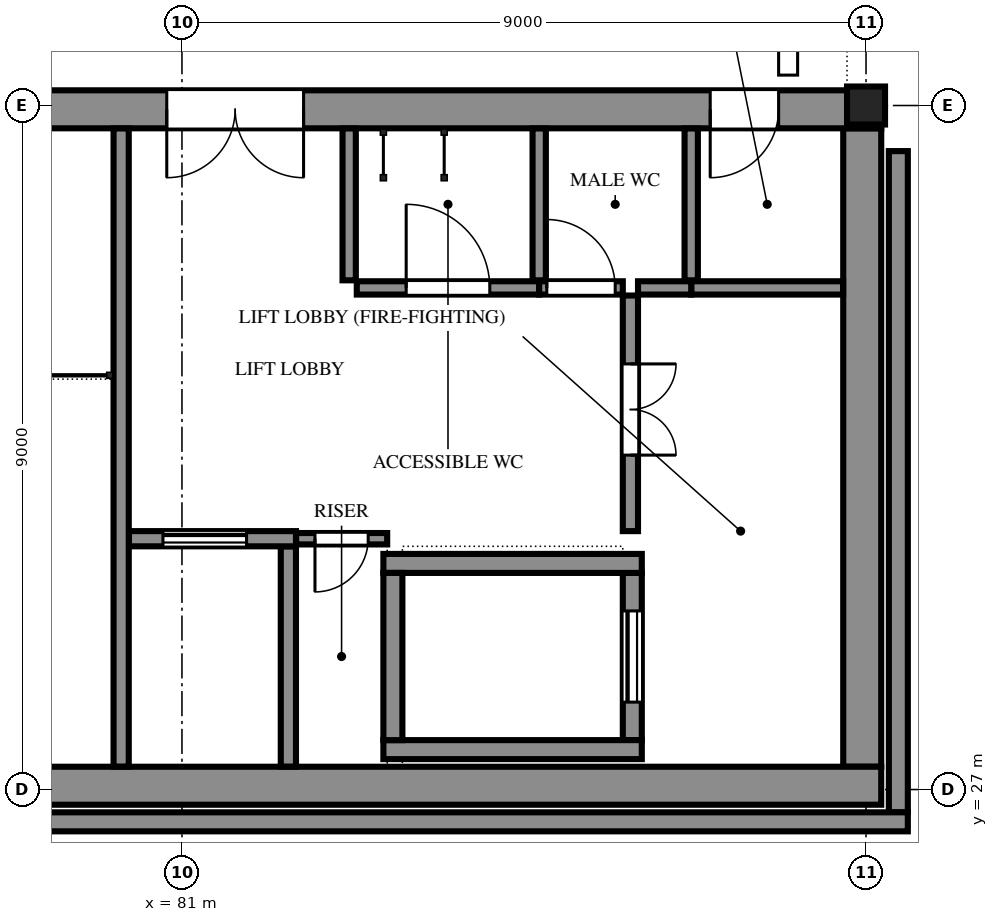
"""IFC4 building model, lengths in metres.
Left out: names, types, materials, properties, quantities, classifications, styles, units other than length and angle.
Written with IfcOpenShell. Run it as: python <this file> out.ifc"""

import sys

from ifc_helpers import new_model, si_unit, direction, frame, frame_2d, origin, origin_2d, place, context, subcontext, project, spatial, polyline, rectangle, hollow_rectangle, outline, extrude, element, fill, save


model = new_model("IFC4")
c1 = context("Model", 3, precision=1e-05, world=origin(), true_north=direction((0.0, 1.0)))
c2 = subcontext(c1, "Body", "Model", "MODEL_VIEW")
j1 = project(units=[si_unit("LENGTHUNIT", "METRE"), si_unit("PLANEANGLEUNIT", "RADIAN")], contexts=[c1])
p1 = place(None, origin())
s1 = spatial("IfcSite", under=j1, at=p1, CompositionType="ELEMENT")
p2 = place(p1, origin())
s2 = spatial("IfcBuilding", under=s1, at=p2, CompositionType="ELEMENT")
p3 = place(p2, frame((0.0, 0.0, 20.1)))
s3 = spatial("IfcBuildingStorey", under=s2, at=p3, CompositionType="ELEMENT", Elevation=20.1)
p4 = place(p3, frame((90.0, 36.0, 0.0), z_axis=(0.0, 0.0, 1.0), x_axis=(1.0, 0.0, 0.0)))
e1 = element("IfcColumn", 1, at=p4, inside=s3, PredefinedType="COLUMN", context=c2, shape_type="SweptSolid", body=[
    extrude(hollow_rectangle(XDim=0.5, YDim=0.5, WallThickness=0.032, at=origin_2d()), origin(), (0.0, 0.0, 1.0), 4.2),
])
p5 = place(p3, frame((71.8, 27.05, 0.0), z_axis=(0.0, 0.0, 1.0), x_axis=(1.0, 0.0, 0.0)))
e2 = element("IfcWall", 2, at=p5, inside=s3, PredefinedType="SOLIDWALL", context=c2, shape_type="SweptSolid", body=[
    extrude(rectangle(XDim=18.4, YDim=0.5, at=frame_2d((9.2, 0.0))), origin(), (0.0, 0.0, 1.0), 4.2),
])
p6 = place(p3, frame((71.8, 35.95, 0.0), z_axis=(0.0, 0.0, 1.0), x_axis=(1.0, 0.0, 0.0)))
e3 = element("IfcWall", 3, at=p6, inside=s3, PredefinedType="SOLIDWALL", context=c2, shape_type="SweptSolid", body=[
    extrude(rectangle(XDim=18.4, YDim=0.5, at=frame_2d((9.2, 0.0))), origin(), (0.0, 0.0, 1.0), 4.2),
])
p7 = place(p6, frame((1.5, 0.0, 0.0)))
e4 = element("IfcOpeningElement", 4, at=p7, cuts=e3, PredefinedType="OPENING", context=c2, shape_type="SweptSolid", body=[
    extrude(rectangle(XDim=1.8, YDim=2.1, at=frame_2d((0.9, 1.05))), frame((0.0, 0.26, 0.0), z_axis=(0.0, -1.0, 0.0), x_axis=(1.0, 0.0, 0.0)), (0.0, 0.0, 1.0), 0.52),
])
p8 = place(p6, frame((5.5, 0.0, 0.0)))
e5 = element("IfcOpeningElement", 5, at=p8, cuts=e3, PredefinedType="OPENING", context=c2, shape_type="SweptSolid", body=[
    extrude(rectangle(XDim=1.8, YDim=2.1, at=frame_2d((0.9, 1.05))), frame((0.0, 0.26, 0.0), z_axis=(0.0, -1.0, 0.0), x_axis=(1.0, 0.0, 0.0)), (0.0, 0.0, 1.0), 0.52),
])
p9 = place(p6, frame((9.0, 0.0, 0.0)))
e6 = element("IfcOpeningElement", 6, at=p9, cuts=e3, PredefinedType="OPENING", context=c2, shape_type="SweptSolid", body=[
    extrude(rectangle(XDim=1.8, YDim=2.1, at=frame_2d((0.9, 1.05))), frame((0.0, 0.26, 0.0), z_axis=(0.0, -1.0, 0.0), x_axis=(1.0, 0.0, 0.0)), (0.0, 0.0, 1.0), 0.52),
])
p10 = place(p6, frame((16.15, 0.0, 0.0)))
e7 = element("IfcOpeningElement", 7, at=p10, cuts=e3, PredefinedType="OPENING", context=c2, shape_type="SweptSolid", body=[
    extrude(rectangle(XDim=0.9, YDim=2.1, at=frame_2d((0.45, 1.05))), frame((0.0, 0.26, 0.0), z_axis=(0.0, -1.0, 0.0), x_axis=(1.0, 0.0, 0.0)), (0.0, 0.0, 1.0), 0.52),
])
p11 = place(p3, frame((89.95, 27.3, 0.0), z_axis=(0.0, 0.0, 1.0), x_axis=(0.0, 1.0, 0.0)))
e8 = element("IfcWall", 8, at=p11, inside=s3, PredefinedType="SOLIDWALL", context=c2, shape_type="SweptSolid", body=[
    extrude(rectangle(XDim=8.4, YDim=0.5, at=frame_2d((4.2, 0.0))), origin(), (0.0, 0.0, 1.0), 4.2),
])
p12 = place(p3, frame((80.2, 27.302, -0.15), z_axis=(0.0, 0.0, 1.0), x_axis=(0.0, 1.0, 0.0)))
e9 = element("IfcWall", 9, at=p12, inside=s3, PredefinedType="SOLIDWALL", context=c2, shape_type="SweptSolid", body=[
    extrude(rectangle(XDim=8.396, YDim=0.2, at=frame_2d((4.198, 0.0))), origin(), (0.0, 0.0, 1.0), 3.666),
])
p13 = place(p3, frame((80.302, 30.3, 0.0), z_axis=(0.0, 0.0, 1.0), x_axis=(1.0, 0.0, 0.0)))
e10 = element("IfcWall", 10, at=p13, inside=s3, PredefinedType="SOLIDWALL", context=c2, shape_type="SweptSolid", body=[
    extrude(rectangle(XDim=2.198, YDim=0.2, at=frame_2d((1.099, 0.0))), origin(), (0.0, 0.0, 1.0), 3.516),
])
p14 = place(p13, frame((0.448, 0.0, 0.0)))
e11 = element("IfcOpeningElement", 11, at=p14, cuts=e10, PredefinedType="OPENING", context=c2, shape_type="SweptSolid", body=[
    extrude(rectangle(XDim=1.1, YDim=2.1, at=frame_2d((0.55, 1.05))), frame((0.0, 0.11, 0.0), z_axis=(0.0, -1.0, 0.0), x_axis=(1.0, 0.0, 0.0)), (0.0, 0.0, 1.0), 0.22),
])
p15 = place(p3, frame((82.4, 27.302, 0.0), z_axis=(0.0, 0.0, 1.0), x_axis=(0.0, 1.0, 0.0)))
e12 = element("IfcWall", 12, at=p15, inside=s3, PredefinedType="SOLIDWALL", context=c2, shape_type="SweptSolid", body=[
    extrude(rectangle(XDim=2.898, YDim=0.2, at=frame_2d((1.449, 0.0))), origin(), (0.0, 0.0, 1.0), 3.516),
])
for number, where, z_axis, x_axis in (
    (13, (83.65, 27.525, 0.0), (0.0, 0.0, 1.0), (1.0, 0.0, 0.0)),
    (14, (83.65, 29.975, 0.0), (0.0, 0.0, 1.0), (1.0, 0.0, 0.0)),
):
    element("IfcWall", number, at=place(p3, frame(where, z_axis=z_axis, x_axis=x_axis)), inside=s3, PredefinedType="SOLIDWALL", context=c2, shape_type="SweptSolid", body=[
        extrude(rectangle(XDim=3.4, YDim=0.25, at=frame_2d((1.7, 0.0))), origin(), (0.0, 0.0, 1.0), 3.516),
    ])
p16 = place(p3, frame((83.775, 27.65, 0.0), z_axis=(0.0, 0.0, 1.0), x_axis=(0.0, 1.0, 0.0)))
e15 = element("IfcWall", 15, at=p16, inside=s3, PredefinedType="SOLIDWALL", context=c2, shape_type="SweptSolid", body=[
    extrude(rectangle(XDim=2.2, YDim=0.25, at=frame_2d((1.1, 0.0))), origin(), (0.0, 0.0, 1.0), 3.516),
])
p17 = place(p3, frame((86.925, 27.65, 0.0), z_axis=(0.0, 0.0, 1.0), x_axis=(0.0, 1.0, 0.0)))
e16 = element("IfcWall", 16, at=p17, inside=s3, PredefinedType="SOLIDWALL", context=c2, shape_type="SweptSolid", body=[
    extrude(rectangle(XDim=2.2, YDim=0.25, at=frame_2d((1.1, 0.0))), origin(), (0.0, 0.0, 1.0), 3.516),
])
p18 = place(p17, frame((0.5, 0.0, 0.0)))
e17 = element("IfcOpeningElement", 17, at=p18, cuts=e16, PredefinedType="OPENING", context=c2, shape_type="SweptSolid", body=[
    extrude(rectangle(XDim=1.2, YDim=2.1, at=frame_2d((0.6, 1.05))), frame((0.0, 0.135, 0.0), z_axis=(0.0, -1.0, 0.0), x_axis=(1.0, 0.0, 0.0)), (0.0, 0.0, 1.0), 0.27),
])
p19 = place(p3, frame((83.7, 30.3, 0.0), z_axis=(0.0, 0.0, 1.0), x_axis=(-1.0, 0.0, 0.0)))
e18 = element("IfcWall", 18, at=p19, inside=s3, PredefinedType="SOLIDWALL", context=c2, shape_type="SweptSolid", body=[
    extrude(rectangle(XDim=1.198, YDim=0.15, at=frame_2d((0.599, 0.0))), origin(), (0.0, 0.0, 1.0), 3.516),
])
p20 = place(p19, frame((0.25, 0.0, 0.0)))
e19 = element("IfcOpeningElement", 19, at=p20, cuts=e18, PredefinedType="OPENING", context=c2, shape_type="SweptSolid", body=[
    extrude(rectangle(XDim=0.7, YDim=2.0, at=frame_2d((0.35, 1.0))), frame((0.0, 0.085, 0.0), z_axis=(0.0, -1.0, 0.0), x_axis=(1.0, 0.0, 0.0)), (0.0, 0.0, 1.0), 0.17),
])
p21 = place(p3, frame((86.9, 33.5, 0.0), z_axis=(0.0, 0.0, 1.0), x_axis=(0.0, -1.0, 0.0)))
e20 = element("IfcWall", 20, at=p21, inside=s3, PredefinedType="PARTITIONING", context=c2, shape_type="SweptSolid", body=[
    extrude(rectangle(XDim=3.1, YDim=0.2, at=frame_2d((1.55, 0.0))), origin(), (0.0, 0.0, 1.0), 3.382),
])
p22 = place(p21, frame((0.9, 0.0, 0.0)))
e21 = element("IfcOpeningElement", 21, at=p22, cuts=e20, PredefinedType="OPENING", context=c2, shape_type="SweptSolid", body=[
    extrude(rectangle(XDim=1.2, YDim=2.1, at=frame_2d((0.6, 1.05))), frame((0.0, 0.11, 0.0), z_axis=(0.0, -1.0, 0.0), x_axis=(1.0, 0.0, 0.0)), (0.0, 0.0, 1.0), 0.22),
])
p23 = place(p3, frame((83.2, 35.698, 0.0), z_axis=(0.0, 0.0, 1.0), x_axis=(0.0, -1.0, 0.0)))
e22 = element("IfcWall", 22, at=p23, inside=s3, PredefinedType="PARTITIONING", context=c2, shape_type="SweptSolid", body=[
    extrude(rectangle(XDim=1.998, YDim=0.175, at=frame_2d((0.999, 0.0))), origin(), (0.0, 0.0, 1.0), 3.307),
])
p24 = place(p3, frame((83.3, 33.6, 0.0), z_axis=(0.0, 0.0, 1.0), x_axis=(1.0, 0.0, 0.0)))
e23 = element("IfcWall", 23, at=p24, inside=s3, PredefinedType="PARTITIONING", context=c2, shape_type="SweptSolid", body=[
    extrude(rectangle(XDim=2.4, YDim=0.175, at=frame_2d((1.2, 0.0))), origin(), (0.0, 0.0, 1.0), 3.307),
])
p25 = place(p24, frame((0.65, 0.0, 0.0)))
e24 = element("IfcOpeningElement", 24, at=p25, cuts=e23, PredefinedType="OPENING", context=c2, shape_type="SweptSolid", body=[
    extrude(rectangle(XDim=1.1, YDim=2.1, at=frame_2d((0.55, 1.05))), frame((0.0, 0.097, 0.0), z_axis=(0.0, -1.0, 0.0), x_axis=(1.0, 0.0, 0.0)), (0.0, 0.0, 1.0), 0.195),
])
p26 = place(p3, frame((85.7, 33.6, 0.0), z_axis=(0.0, 0.0, 1.0), x_axis=(1.0, 0.0, 0.0)))
e25 = element("IfcWall", 25, at=p26, inside=s3, PredefinedType="PARTITIONING", context=c2, shape_type="SweptSolid", body=[
    extrude(rectangle(XDim=1.1, YDim=0.175, at=frame_2d((0.55, 0.0))), origin(), (0.0, 0.0, 1.0), 3.307),
])
p27 = place(p26, frame((0.1, 0.0, 0.0)))
e26 = element("IfcOpeningElement", 26, at=p27, cuts=e25, PredefinedType="OPENING", context=c2, shape_type="SweptSolid", body=[
    extrude(rectangle(XDim=0.9, YDim=2.1, at=frame_2d((0.45, 1.05))), frame((0.0, 0.097, 0.0), z_axis=(0.0, -1.0, 0.0), x_axis=(1.0, 0.0, 0.0)), (0.0, 0.0, 1.0), 0.195),
])
p28 = place(p3, frame((87.7, 33.6, 0.0), z_axis=(0.0, 0.0, 1.0), x_axis=(1.0, 0.0, 0.0)))
e27 = element("IfcWall", 27, at=p28, inside=s3, PredefinedType="PARTITIONING", context=c2, shape_type="SweptSolid", body=[
    extrude(rectangle(XDim=1.998, YDim=0.175, at=frame_2d((0.999, 0.0))), origin(), (0.0, 0.0, 1.0), 3.307),
])
p29 = place(p3, frame((87.0, 33.6, 0.0), z_axis=(0.0, 0.0, 1.0), x_axis=(1.0, 0.0, 0.0)))
e28 = element("IfcWall", 28, at=p29, inside=s3, PredefinedType="PARTITIONING", context=c2, shape_type="SweptSolid", body=[
    extrude(rectangle(XDim=0.7, YDim=0.175, at=frame_2d((0.35, 0.0))), origin(), (0.0, 0.0, 1.0), 3.307),
])
for number, where, z_axis, x_axis in (
    (29, (85.7, 35.698, 0.0), (0.0, 0.0, 1.0), (0.0, -1.0, 0.0)),
    (30, (87.7, 35.698, 0.0), (0.0, 0.0, 1.0), (0.0, -1.0, 0.0)),
):
    element("IfcWall", number, at=place(p3, frame(where, z_axis=z_axis, x_axis=x_axis)), inside=s3, PredefinedType="PARTITIONING", context=c2, shape_type="SweptSolid", body=[
        extrude(rectangle(XDim=1.998, YDim=0.175, at=frame_2d((0.999, 0.0))), origin(), (0.0, 0.0, 1.0), 3.307),
    ])
p30 = place(p14, origin())
e31 = element("IfcDoor", 31, at=p30, inside=s3, OperationType="SLIDING_TO_LEFT", PredefinedType="DOOR", context=c2, shape_type="SweptSolid", body=[
    extrude(outline(polyline([(0.0, 0.0), (0.07, 0.0), (0.07, 2.03), (1.03, 2.03), (1.03, 0.0), (1.1, 0.0), (1.1, 2.1), (0.0, 2.1), (0.0, 0.0)])), frame((0.0, 0.025, 0.0), z_axis=(0.0, -1.0, 0.0), x_axis=(1.0, 0.0, 0.0)), (0.0, 0.0, 1.0), 0.05),
    extrude(rectangle(XDim=0.524, YDim=2.016, at=frame_2d((0.336, 1.018))), frame((0.0, 0.018, 0.0), z_axis=(0.0, -1.0, 0.0), x_axis=(1.0, 0.0, 0.0)), (0.0, 0.0, 1.0), 0.016),
    extrude(rectangle(XDim=0.52, YDim=2.016, at=frame_2d((0.766, 1.018))), frame((0.0, -0.002, 0.0), z_axis=(0.0, -1.0, 0.0), x_axis=(1.0, 0.0, 0.0)), (0.0, 0.0, 1.0), 0.016),
])
fill(e11, e31)
p31 = place(p18, origin())
e32 = element("IfcDoor", 32, at=p31, inside=s3, OperationType="SLIDING_TO_LEFT", PredefinedType="DOOR", context=c2, shape_type="SweptSolid", body=[
    extrude(outline(polyline([(0.0, 0.0), (0.07, 0.0), (0.07, 2.03), (1.13, 2.03), (1.13, 0.0), (1.2, 0.0), (1.2, 2.1), (0.0, 2.1), (0.0, 0.0)])), frame((0.0, 0.025, 0.0), z_axis=(0.0, -1.0, 0.0), x_axis=(1.0, 0.0, 0.0)), (0.0, 0.0, 1.0), 0.05),
    extrude(rectangle(XDim=0.579, YDim=2.016, at=frame_2d((0.363, 1.018))), frame((0.0, 0.018, 0.0), z_axis=(0.0, -1.0, 0.0), x_axis=(1.0, 0.0, 0.0)), (0.0, 0.0, 1.0), 0.016),
    extrude(rectangle(XDim=0.575, YDim=2.016, at=frame_2d((0.839, 1.018))), frame((0.0, -0.002, 0.0), z_axis=(0.0, -1.0, 0.0), x_axis=(1.0, 0.0, 0.0)), (0.0, 0.0, 1.0), 0.016),
])
fill(e17, e32)
p32 = place(p9, frame((1.8, 0.0, 0.0), z_axis=(0.0, 0.0, 1.0), x_axis=(-1.0, 0.0, 0.0)))
e33 = element("IfcDoor", 33, at=p32, inside=s3, OperationType="DOUBLE_DOOR_SINGLE_SWING", PredefinedType="DOOR", context=c2, shape_type="SweptSolid", body=[
    extrude(outline(polyline([(0.0, 0.0), (0.07, 0.0), (0.07, 2.03), (1.73, 2.03), (1.73, 0.0), (1.8, 0.0), (1.8, 2.1), (0.0, 2.1), (0.0, 0.0)])), frame((0.0, 0.025, 0.0), z_axis=(0.0, -1.0, 0.0), x_axis=(1.0, 0.0, 0.0)), (0.0, 0.0, 1.0), 0.05),
    extrude(outline(polyline([(0.074, 0.01), (0.897, 0.01), (0.897, 2.026), (0.074, 2.026), (0.074, 0.01)]), holes=[polyline([(0.194, 0.16), (0.777, 0.16), (0.777, 1.01), (0.194, 1.01), (0.194, 0.16)]), polyline([(0.335, 1.16), (0.635, 1.16), (0.635, 1.76), (0.335, 1.76), (0.335, 1.16)])]), frame((0.0, 0.017, 0.0), z_axis=(0.0, -1.0, 0.0), x_axis=(1.0, 0.0, 0.0)), (0.0, 0.0, 1.0), 0.035),
    extrude(rectangle(XDim=0.583, YDim=0.85, at=frame_2d((0.485, 0.585))), frame((0.0, 0.009, 0.0), z_axis=(0.0, -1.0, 0.0), x_axis=(1.0, 0.0, 0.0)), (0.0, 0.0, 1.0), 0.017),
    extrude(rectangle(XDim=0.3, YDim=0.6, at=frame_2d((0.485, 1.46))), frame((0.0, 0.006, 0.0), z_axis=(0.0, -1.0, 0.0), x_axis=(1.0, 0.0, 0.0)), (0.0, 0.0, 1.0), 0.012),
    extrude(outline(polyline([(0.903, 0.01), (1.726, 0.01), (1.726, 2.026), (0.903, 2.026), (0.903, 0.01)]), holes=[polyline([(1.023, 0.16), (1.606, 0.16), (1.606, 1.01), (1.023, 1.01), (1.023, 0.16)]), polyline([(1.165, 1.16), (1.465, 1.16), (1.465, 1.76), (1.165, 1.76), (1.165, 1.16)])]), frame((0.0, 0.017, 0.0), z_axis=(0.0, -1.0, 0.0), x_axis=(1.0, 0.0, 0.0)), (0.0, 0.0, 1.0), 0.035),
    extrude(rectangle(XDim=0.583, YDim=0.85, at=frame_2d((1.314, 0.585))), frame((0.0, 0.009, 0.0), z_axis=(0.0, -1.0, 0.0), x_axis=(1.0, 0.0, 0.0)), (0.0, 0.0, 1.0), 0.017),
    extrude(rectangle(XDim=0.3, YDim=0.6, at=frame_2d((1.314, 1.46))), frame((0.0, 0.006, 0.0), z_axis=(0.0, -1.0, 0.0), x_axis=(1.0, 0.0, 0.0)), (0.0, 0.0, 1.0), 0.012),
])
fill(e6, e33)
p33 = place(p22, origin())
e34 = element("IfcDoor", 34, at=p33, inside=s3, OperationType="DOUBLE_DOOR_SINGLE_SWING", PredefinedType="DOOR", context=c2, shape_type="SweptSolid", body=[
    extrude(outline(polyline([(0.0, 0.0), (0.07, 0.0), (0.07, 2.03), (1.13, 2.03), (1.13, 0.0), (1.2, 0.0), (1.2, 2.1), (0.0, 2.1), (0.0, 0.0)])), frame((0.0, 0.025, 0.0), z_axis=(0.0, -1.0, 0.0), x_axis=(1.0, 0.0, 0.0)), (0.0, 0.0, 1.0), 0.05),
    extrude(outline(polyline([(0.074, 0.01), (0.597, 0.01), (0.597, 2.026), (0.074, 2.026), (0.074, 0.01)]), holes=[polyline([(0.178, 0.373), (0.492, 0.373), (0.492, 1.784), (0.178, 1.784), (0.178, 0.373)])]), frame((0.0, 0.017, 0.0), z_axis=(0.0, -1.0, 0.0), x_axis=(1.0, 0.0, 0.0)), (0.0, 0.0, 1.0), 0.035),
    extrude(rectangle(XDim=0.314, YDim=1.411, at=frame_2d((0.335, 1.079))), frame((0.0, 0.009, 0.0), z_axis=(0.0, -1.0, 0.0), x_axis=(1.0, 0.0, 0.0)), (0.0, 0.0, 1.0), 0.017),
    extrude(outline(polyline([(0.603, 0.01), (1.126, 0.01), (1.126, 2.026), (0.603, 2.026), (0.603, 0.01)]), holes=[polyline([(0.708, 0.373), (1.021, 0.373), (1.021, 1.784), (0.708, 1.784), (0.708, 0.373)])]), frame((0.0, 0.017, 0.0), z_axis=(0.0, -1.0, 0.0), x_axis=(1.0, 0.0, 0.0)), (0.0, 0.0, 1.0), 0.035),
    extrude(rectangle(XDim=0.314, YDim=1.411, at=frame_2d((0.865, 1.079))), frame((0.0, 0.009, 0.0), z_axis=(0.0, -1.0, 0.0), x_axis=(1.0, 0.0, 0.0)), (0.0, 0.0, 1.0), 0.017),
])
fill(e21, e34)
p34 = place(p20, origin())
e35 = element("IfcDoor", 35, at=p34, inside=s3, OperationType="SINGLE_SWING_RIGHT", PredefinedType="DOOR", context=c2, shape_type="SweptSolid", body=[
    extrude(outline(polyline([(0.0, 0.0), (0.07, 0.0), (0.07, 1.93), (0.63, 1.93), (0.63, 0.0), (0.7, 0.0), (0.7, 2.0), (0.0, 2.0), (0.0, 0.0)])), frame((0.0, 0.025, 0.0), z_axis=(0.0, -1.0, 0.0), x_axis=(1.0, 0.0, 0.0)), (0.0, 0.0, 1.0), 0.05),
    extrude(outline(polyline([(0.074, 0.01), (0.626, 0.01), (0.626, 1.926), (0.074, 1.926), (0.074, 0.01)]), holes=[polyline([(0.184, 0.16), (0.516, 0.16), (0.516, 1.01), (0.184, 1.01), (0.184, 0.16)]), polyline([(0.2, 1.16), (0.5, 1.16), (0.5, 1.76), (0.2, 1.76), (0.2, 1.16)])]), frame((0.0, 0.017, 0.0), z_axis=(0.0, -1.0, 0.0), x_axis=(1.0, 0.0, 0.0)), (0.0, 0.0, 1.0), 0.035),
    extrude(rectangle(XDim=0.331, YDim=0.85, at=frame_2d((0.35, 0.585))), frame((0.0, 0.009, 0.0), z_axis=(0.0, -1.0, 0.0), x_axis=(1.0, 0.0, 0.0)), (0.0, 0.0, 1.0), 0.017),
    extrude(rectangle(XDim=0.3, YDim=0.6, at=frame_2d((0.35, 1.46))), frame((0.0, 0.006, 0.0), z_axis=(0.0, -1.0, 0.0), x_axis=(1.0, 0.0, 0.0)), (0.0, 0.0, 1.0), 0.012),
])
fill(e19, e35)
p35 = place(p25, origin())
e36 = element("IfcDoor", 36, at=p35, inside=s3, OperationType="SINGLE_SWING_LEFT", PredefinedType="DOOR", context=c2, shape_type="SweptSolid", body=[
    extrude(outline(polyline([(0.0, 0.0), (0.07, 0.0), (0.07, 2.03), (1.03, 2.03), (1.03, 0.0), (1.1, 0.0), (1.1, 2.1), (0.0, 2.1), (0.0, 0.0)])), frame((0.0, 0.025, 0.0), z_axis=(0.0, -1.0, 0.0), x_axis=(1.0, 0.0, 0.0)), (0.0, 0.0, 1.0), 0.05),
    extrude(outline(polyline([(0.074, 0.01), (1.026, 0.01), (1.026, 2.026), (0.074, 2.026), (0.074, 0.01)]), holes=[polyline([(0.194, 0.16), (0.906, 0.16), (0.906, 1.01), (0.194, 1.01), (0.194, 0.16)]), polyline([(0.4, 1.16), (0.7, 1.16), (0.7, 1.76), (0.4, 1.76), (0.4, 1.16)])]), frame((0.0, 0.017, 0.0), z_axis=(0.0, -1.0, 0.0), x_axis=(1.0, 0.0, 0.0)), (0.0, 0.0, 1.0), 0.035),
    extrude(rectangle(XDim=0.712, YDim=0.85, at=frame_2d((0.55, 0.585))), frame((0.0, 0.009, 0.0), z_axis=(0.0, -1.0, 0.0), x_axis=(1.0, 0.0, 0.0)), (0.0, 0.0, 1.0), 0.017),
    extrude(rectangle(XDim=0.3, YDim=0.6, at=frame_2d((0.55, 1.46))), frame((0.0, 0.006, 0.0), z_axis=(0.0, -1.0, 0.0), x_axis=(1.0, 0.0, 0.0)), (0.0, 0.0, 1.0), 0.012),
])
fill(e24, e36)
p36 = place(p27, origin())
e37 = element("IfcDoor", 37, at=p36, inside=s3, OperationType="SINGLE_SWING_LEFT", PredefinedType="DOOR", context=c2, shape_type="SweptSolid", body=[
    extrude(outline(polyline([(0.0, 0.0), (0.07, 0.0), (0.07, 2.03), (0.83, 2.03), (0.83, 0.0), (0.9, 0.0), (0.9, 2.1), (0.0, 2.1), (0.0, 0.0)])), frame((0.0, 0.025, 0.0), z_axis=(0.0, -1.0, 0.0), x_axis=(1.0, 0.0, 0.0)), (0.0, 0.0, 1.0), 0.05),
    extrude(outline(polyline([(0.074, 0.01), (0.826, 0.01), (0.826, 2.026), (0.074, 2.026), (0.074, 0.01)]), holes=[polyline([(0.194, 0.16), (0.706, 0.16), (0.706, 1.01), (0.194, 1.01), (0.194, 0.16)]), polyline([(0.3, 1.16), (0.6, 1.16), (0.6, 1.76), (0.3, 1.76), (0.3, 1.16)])]), frame((0.0, 0.017, 0.0), z_axis=(0.0, -1.0, 0.0), x_axis=(1.0, 0.0, 0.0)), (0.0, 0.0, 1.0), 0.035),
    extrude(rectangle(XDim=0.512, YDim=0.85, at=frame_2d((0.45, 0.585))), frame((0.0, 0.009, 0.0), z_axis=(0.0, -1.0, 0.0), x_axis=(1.0, 0.0, 0.0)), (0.0, 0.0, 1.0), 0.017),
    extrude(rectangle(XDim=0.3, YDim=0.6, at=frame_2d((0.45, 1.46))), frame((0.0, 0.006, 0.0), z_axis=(0.0, -1.0, 0.0), x_axis=(1.0, 0.0, 0.0)), (0.0, 0.0, 1.0), 0.012),
])
fill(e26, e37)
p37 = place(p10, frame((0.9, 0.0, 0.0), z_axis=(0.0, 0.0, 1.0), x_axis=(-1.0, 0.0, 0.0)))
e38 = element("IfcDoor", 38, at=p37, inside=s3, OperationType="SINGLE_SWING_RIGHT", PredefinedType="DOOR", context=c2, shape_type="SweptSolid", body=[
    extrude(outline(polyline([(0.0, 0.0), (0.07, 0.0), (0.07, 2.03), (0.83, 2.03), (0.83, 0.0), (0.9, 0.0), (0.9, 2.1), (0.0, 2.1), (0.0, 0.0)])), frame((0.0, 0.025, 0.0), z_axis=(0.0, -1.0, 0.0), x_axis=(1.0, 0.0, 0.0)), (0.0, 0.0, 1.0), 0.05),
    extrude(outline(polyline([(0.074, 0.01), (0.826, 0.01), (0.826, 2.026), (0.074, 2.026), (0.074, 0.01)]), holes=[polyline([(0.194, 0.16), (0.706, 0.16), (0.706, 1.01), (0.194, 1.01), (0.194, 0.16)]), polyline([(0.3, 1.16), (0.6, 1.16), (0.6, 1.76), (0.3, 1.76), (0.3, 1.16)])]), frame((0.0, 0.017, 0.0), z_axis=(0.0, -1.0, 0.0), x_axis=(1.0, 0.0, 0.0)), (0.0, 0.0, 1.0), 0.035),
    extrude(rectangle(XDim=0.512, YDim=0.85, at=frame_2d((0.45, 0.585))), frame((0.0, 0.009, 0.0), z_axis=(0.0, -1.0, 0.0), x_axis=(1.0, 0.0, 0.0)), (0.0, 0.0, 1.0), 0.017),
    extrude(rectangle(XDim=0.3, YDim=0.6, at=frame_2d((0.45, 1.46))), frame((0.0, 0.006, 0.0), z_axis=(0.0, -1.0, 0.0), x_axis=(1.0, 0.0, 0.0)), (0.0, 0.0, 1.0), 0.012),
])
fill(e7, e38)
save(model, sys.argv[1])
